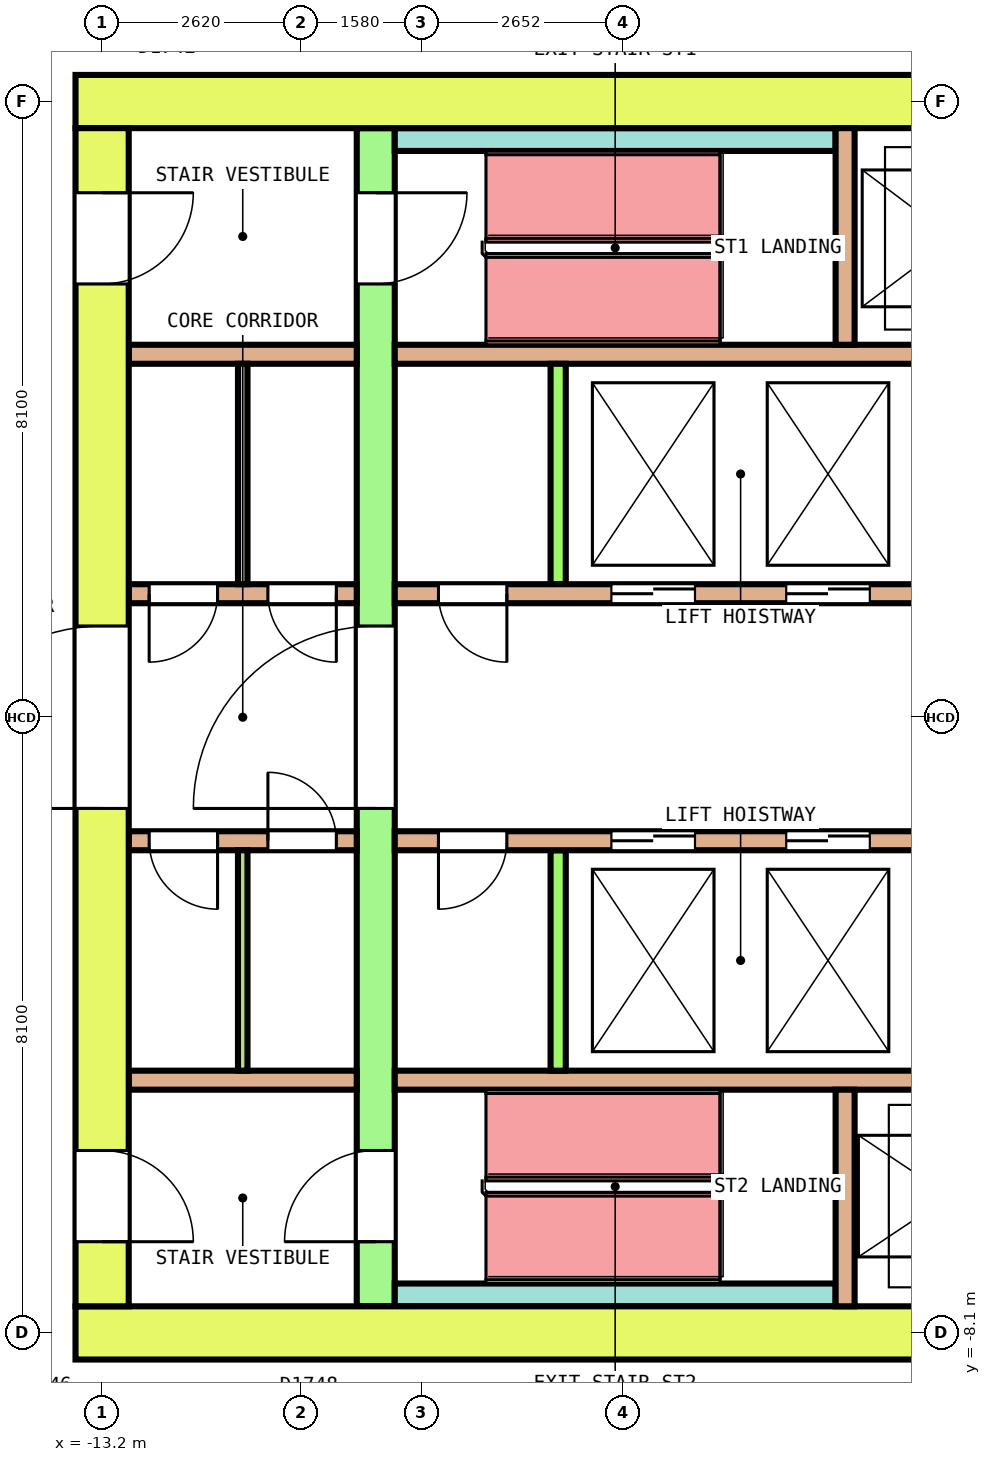
"""IFC4 building model, lengths in metres.
Left out: names, types, materials, properties, quantities, classifications, styles, units other than length and angle.
Written with IfcOpenShell. Run it as: python <this file> out.ifc"""

import sys

from ifc_helpers import new_model, si_unit, direction, frame, frame_2d, origin, place, context, subcontext, project, spatial, rectangle, extrude, element, fill, save


model = new_model("IFC4")
c1 = context("Model", 3, precision=1e-05, world=origin(), true_north=direction((0.0, 1.0)))
c2 = subcontext(c1, "Body", "Model", "MODEL_VIEW")
j1 = project(units=[si_unit("LENGTHUNIT", "METRE"), si_unit("PLANEANGLEUNIT", "RADIAN")], contexts=[c1])
p1 = place(None, origin())
s1 = spatial("IfcSite", under=j1, at=p1, CompositionType="ELEMENT")
p2 = place(p1, origin())
s2 = spatial("IfcBuilding", under=s1, at=p2, CompositionType="ELEMENT")
p3 = place(p2, frame((0.0, 0.0, 158.4)))
s3 = spatial("IfcBuildingStorey", under=s2, at=p3, CompositionType="ELEMENT", Elevation=158.4)
p4 = place(p3, frame((-13.55, 8.1, 0.0), z_axis=(0.0, 0.0, 1.0), x_axis=(1.0, 0.0, 0.0)))
e1 = element("IfcWall", 1, at=p4, inside=s3, PredefinedType="SHEAR", context=c2, shape_type="SweptSolid", body=[
    extrude(rectangle(XDim=27.1, YDim=0.7, at=frame_2d((13.55, 0.0))), origin(), (0.0, 0.0, 1.0), 4.1),
])
p5 = place(p4, frame((14.475, 0.0, 0.0)))
e2 = element("IfcOpeningElement", 2, at=p5, cuts=e1, PredefinedType="OPENING", context=c2, shape_type="SweptSolid", body=[
    extrude(rectangle(XDim=1.4, YDim=2.1, at=frame_2d((0.7, 1.05))), frame((0.0, 0.36, 0.0), z_axis=(0.0, -1.0, 0.0), x_axis=(1.0, 0.0, 0.0)), (0.0, 0.0, 1.0), 0.72),
])
p6 = place(p3, frame((-13.55, -8.1, 0.0), z_axis=(0.0, 0.0, 1.0), x_axis=(1.0, 0.0, 0.0)))
e3 = element("IfcWall", 3, at=p6, inside=s3, PredefinedType="SHEAR", context=c2, shape_type="SweptSolid", body=[
    extrude(rectangle(XDim=27.1, YDim=0.7, at=frame_2d((13.55, 0.0))), origin(), (0.0, 0.0, 1.0), 4.1),
])
p7 = place(p6, frame((15.1, 0.0, 0.0)))
e4 = element("IfcOpeningElement", 4, at=p7, cuts=e3, PredefinedType="OPENING", context=c2, shape_type="SweptSolid", body=[
    extrude(rectangle(XDim=1.2, YDim=2.1, at=frame_2d((0.6, 1.05))), frame((0.0, 0.36, 0.0), z_axis=(0.0, -1.0, 0.0), x_axis=(1.0, 0.0, 0.0)), (0.0, 0.0, 1.0), 0.72),
])
p8 = place(p3, frame((-13.2, -7.75, 0.0), z_axis=(0.0, 0.0, 1.0), x_axis=(0.0, 1.0, 0.0)))
e5 = element("IfcWall", 5, at=p8, inside=s3, PredefinedType="SHEAR", context=c2, shape_type="SweptSolid", body=[
    extrude(rectangle(XDim=15.5, YDim=0.7, at=frame_2d((7.75, 0.0))), origin(), (0.0, 0.0, 1.0), 4.1),
])
p9 = place(p8, frame((6.55, 0.0, 0.0)))
e6 = element("IfcOpeningElement", 6, at=p9, cuts=e5, PredefinedType="OPENING", context=c2, shape_type="SweptSolid", body=[
    extrude(rectangle(XDim=2.4, YDim=2.1, at=frame_2d((1.2, 1.05))), frame((0.0, 0.36, 0.0), z_axis=(0.0, -1.0, 0.0), x_axis=(1.0, 0.0, 0.0)), (0.0, 0.0, 1.0), 0.72),
])
p10 = place(p8, frame((13.45, 0.0, 0.0)))
e7 = element("IfcOpeningElement", 7, at=p10, cuts=e5, PredefinedType="OPENING", context=c2, shape_type="SweptSolid", body=[
    extrude(rectangle(XDim=1.2, YDim=2.1, at=frame_2d((0.6, 1.05))), frame((0.0, 0.36, 0.0), z_axis=(0.0, -1.0, 0.0), x_axis=(1.0, 0.0, 0.0)), (0.0, 0.0, 1.0), 0.72),
])
p11 = place(p8, frame((0.85, 0.0, 0.0)))
e8 = element("IfcOpeningElement", 8, at=p11, cuts=e5, PredefinedType="OPENING", context=c2, shape_type="SweptSolid", body=[
    extrude(rectangle(XDim=1.2, YDim=2.1, at=frame_2d((0.6, 1.05))), frame((0.0, 0.36, 0.0), z_axis=(0.0, -1.0, 0.0), x_axis=(1.0, 0.0, 0.0)), (0.0, 0.0, 1.0), 0.72),
])
p12 = place(p3, frame((-9.6, -7.75, 0.0), z_axis=(0.0, 0.0, 1.0), x_axis=(0.0, 1.0, 0.0)))
e9 = element("IfcWall", 9, at=p12, inside=s3, PredefinedType="SHEAR", context=c2, shape_type="SweptSolid", body=[
    extrude(rectangle(XDim=15.5, YDim=0.5, at=frame_2d((7.75, 0.0))), origin(), (0.0, 0.0, 1.0), 4.1),
])
p13 = place(p12, frame((6.55, 0.0, 0.0)))
e10 = element("IfcOpeningElement", 10, at=p13, cuts=e9, PredefinedType="OPENING", context=c2, shape_type="SweptSolid", body=[
    extrude(rectangle(XDim=2.4, YDim=2.1, at=frame_2d((1.2, 1.05))), frame((0.0, 0.26, 0.0), z_axis=(0.0, -1.0, 0.0), x_axis=(1.0, 0.0, 0.0)), (0.0, 0.0, 1.0), 0.52),
])
p14 = place(p12, frame((13.45, 0.0, 0.0)))
e11 = element("IfcOpeningElement", 11, at=p14, cuts=e9, PredefinedType="OPENING", context=c2, shape_type="SweptSolid", body=[
    extrude(rectangle(XDim=1.2, YDim=2.1, at=frame_2d((0.6, 1.05))), frame((0.0, 0.26, 0.0), z_axis=(0.0, -1.0, 0.0), x_axis=(1.0, 0.0, 0.0)), (0.0, 0.0, 1.0), 0.52),
])
p15 = place(p12, frame((0.85, 0.0, 0.0)))
e12 = element("IfcOpeningElement", 12, at=p15, cuts=e9, PredefinedType="OPENING", context=c2, shape_type="SweptSolid", body=[
    extrude(rectangle(XDim=1.2, YDim=2.1, at=frame_2d((0.6, 1.05))), frame((0.0, 0.26, 0.0), z_axis=(0.0, -1.0, 0.0), x_axis=(1.0, 0.0, 0.0)), (0.0, 0.0, 1.0), 0.52),
])
p16 = place(p3, frame((-12.85, 1.625, 0.0), z_axis=(0.0, 0.0, 1.0), x_axis=(1.0, 0.0, 0.0)))
e13 = element("IfcWall", 13, at=p16, inside=s3, PredefinedType="SOLIDWALL", context=c2, shape_type="SweptSolid", body=[
    extrude(rectangle(XDim=3.0, YDim=0.25, at=frame_2d((1.5, 0.0))), origin(), (0.0, 0.0, 1.0), 4.1),
])
p17 = place(p16, frame((0.269, 0.0, 0.0)))
e14 = element("IfcOpeningElement", 14, at=p17, cuts=e13, PredefinedType="OPENING", context=c2, shape_type="SweptSolid", body=[
    extrude(rectangle(XDim=0.9, YDim=2.1, at=frame_2d((0.45, 1.05))), frame((0.0, 0.135, 0.0), z_axis=(0.0, -1.0, 0.0), x_axis=(1.0, 0.0, 0.0)), (0.0, 0.0, 1.0), 0.27),
])
p18 = place(p16, frame((1.831, 0.0, 0.0)))
e15 = element("IfcOpeningElement", 15, at=p18, cuts=e13, PredefinedType="OPENING", context=c2, shape_type="SweptSolid", body=[
    extrude(rectangle(XDim=0.9, YDim=2.1, at=frame_2d((0.45, 1.05))), frame((0.0, 0.135, 0.0), z_axis=(0.0, -1.0, 0.0), x_axis=(1.0, 0.0, 0.0)), (0.0, 0.0, 1.0), 0.27),
])
p19 = place(p3, frame((-9.35, 1.625, 0.0), z_axis=(0.0, 0.0, 1.0), x_axis=(1.0, 0.0, 0.0)))
e16 = element("IfcWall", 16, at=p19, inside=s3, PredefinedType="SOLIDWALL", context=c2, shape_type="SweptSolid", body=[
    extrude(rectangle(XDim=18.7, YDim=0.25, at=frame_2d((9.35, 0.0))), origin(), (0.0, 0.0, 1.0), 4.1),
])
p20 = place(p19, frame((2.85, 0.0, 0.0)))
e17 = element("IfcOpeningElement", 17, at=p20, cuts=e16, PredefinedType="OPENING", context=c2, shape_type="SweptSolid", body=[
    extrude(rectangle(XDim=1.1, YDim=2.1, at=frame_2d((0.55, 1.05))), frame((0.0, 0.135, 0.0), z_axis=(0.0, -1.0, 0.0), x_axis=(1.0, 0.0, 0.0)), (0.0, 0.0, 1.0), 0.27),
])
p21 = place(p19, frame((5.15, 0.0, 0.0)))
e18 = element("IfcOpeningElement", 18, at=p21, cuts=e16, PredefinedType="OPENING", context=c2, shape_type="SweptSolid", body=[
    extrude(rectangle(XDim=1.1, YDim=2.1, at=frame_2d((0.55, 1.05))), frame((0.0, 0.135, 0.0), z_axis=(0.0, -1.0, 0.0), x_axis=(1.0, 0.0, 0.0)), (0.0, 0.0, 1.0), 0.27),
])
p22 = place(p19, frame((14.8, 0.0, 0.0)))
e19 = element("IfcOpeningElement", 19, at=p22, cuts=e16, PredefinedType="OPENING", context=c2, shape_type="SweptSolid", body=[
    extrude(rectangle(XDim=1.1, YDim=2.1, at=frame_2d((0.55, 1.05))), frame((0.0, 0.135, 0.0), z_axis=(0.0, -1.0, 0.0), x_axis=(1.0, 0.0, 0.0)), (0.0, 0.0, 1.0), 0.27),
])
p23 = place(p19, frame((0.575, 0.0, 0.0)))
e20 = element("IfcOpeningElement", 20, at=p23, cuts=e16, PredefinedType="OPENING", context=c2, shape_type="SweptSolid", body=[
    extrude(rectangle(XDim=0.9, YDim=2.1, at=frame_2d((0.45, 1.05))), frame((0.0, 0.135, 0.0), z_axis=(0.0, -1.0, 0.0), x_axis=(1.0, 0.0, 0.0)), (0.0, 0.0, 1.0), 0.27),
])
p24 = place(p19, frame((17.225, 0.0, 0.0)))
e21 = element("IfcOpeningElement", 21, at=p24, cuts=e16, PredefinedType="OPENING", context=c2, shape_type="SweptSolid", body=[
    extrude(rectangle(XDim=0.9, YDim=2.1, at=frame_2d((0.45, 1.05))), frame((0.0, 0.135, 0.0), z_axis=(0.0, -1.0, 0.0), x_axis=(1.0, 0.0, 0.0)), (0.0, 0.0, 1.0), 0.27),
])
p25 = place(p3, frame((-12.85, 4.775, 0.0), z_axis=(0.0, 0.0, 1.0), x_axis=(1.0, 0.0, 0.0)))
e22 = element("IfcWall", 22, at=p25, inside=s3, PredefinedType="SOLIDWALL", context=c2, shape_type="SweptSolid", body=[
    extrude(rectangle(XDim=3.0, YDim=0.25, at=frame_2d((1.5, 0.0))), origin(), (0.0, 0.0, 1.0), 4.1),
])
p26 = place(p3, frame((-9.35, 4.775, 0.0), z_axis=(0.0, 0.0, 1.0), x_axis=(1.0, 0.0, 0.0)))
e23 = element("IfcWall", 23, at=p26, inside=s3, PredefinedType="SOLIDWALL", context=c2, shape_type="SweptSolid", body=[
    extrude(rectangle(XDim=18.7, YDim=0.25, at=frame_2d((9.35, 0.0))), origin(), (0.0, 0.0, 1.0), 4.1),
])
p27 = place(p3, frame((-7.2, 1.75, 0.0), z_axis=(0.0, 0.0, 1.0), x_axis=(0.0, 1.0, 0.0)))
e24 = element("IfcWall", 24, at=p27, inside=s3, PredefinedType="SOLIDWALL", context=c2, shape_type="SweptSolid", body=[
    extrude(rectangle(XDim=2.9, YDim=0.2, at=frame_2d((1.45, 0.0))), origin(), (0.0, 0.0, 1.0), 4.1),
])
p28 = place(p3, frame((-12.85, -1.625, 0.0), z_axis=(0.0, 0.0, 1.0), x_axis=(1.0, 0.0, 0.0)))
e25 = element("IfcWall", 25, at=p28, inside=s3, PredefinedType="SOLIDWALL", context=c2, shape_type="SweptSolid", body=[
    extrude(rectangle(XDim=3.0, YDim=0.25, at=frame_2d((1.5, 0.0))), origin(), (0.0, 0.0, 1.0), 4.1),
])
p29 = place(p28, frame((0.269, 0.0, 0.0)))
e26 = element("IfcOpeningElement", 26, at=p29, cuts=e25, PredefinedType="OPENING", context=c2, shape_type="SweptSolid", body=[
    extrude(rectangle(XDim=0.9, YDim=2.1, at=frame_2d((0.45, 1.05))), frame((0.0, 0.135, 0.0), z_axis=(0.0, -1.0, 0.0), x_axis=(1.0, 0.0, 0.0)), (0.0, 0.0, 1.0), 0.27),
])
p30 = place(p28, frame((1.831, 0.0, 0.0)))
e27 = element("IfcOpeningElement", 27, at=p30, cuts=e25, PredefinedType="OPENING", context=c2, shape_type="SweptSolid", body=[
    extrude(rectangle(XDim=0.9, YDim=2.1, at=frame_2d((0.45, 1.05))), frame((0.0, 0.135, 0.0), z_axis=(0.0, -1.0, 0.0), x_axis=(1.0, 0.0, 0.0)), (0.0, 0.0, 1.0), 0.27),
])
p31 = place(p3, frame((-9.35, -1.625, 0.0), z_axis=(0.0, 0.0, 1.0), x_axis=(1.0, 0.0, 0.0)))
e28 = element("IfcWall", 28, at=p31, inside=s3, PredefinedType="SOLIDWALL", context=c2, shape_type="SweptSolid", body=[
    extrude(rectangle(XDim=18.7, YDim=0.25, at=frame_2d((9.35, 0.0))), origin(), (0.0, 0.0, 1.0), 4.1),
])
p32 = place(p31, frame((2.85, 0.0, 0.0)))
e29 = element("IfcOpeningElement", 29, at=p32, cuts=e28, PredefinedType="OPENING", context=c2, shape_type="SweptSolid", body=[
    extrude(rectangle(XDim=1.1, YDim=2.1, at=frame_2d((0.55, 1.05))), frame((0.0, 0.135, 0.0), z_axis=(0.0, -1.0, 0.0), x_axis=(1.0, 0.0, 0.0)), (0.0, 0.0, 1.0), 0.27),
])
p33 = place(p31, frame((5.15, 0.0, 0.0)))
e30 = element("IfcOpeningElement", 30, at=p33, cuts=e28, PredefinedType="OPENING", context=c2, shape_type="SweptSolid", body=[
    extrude(rectangle(XDim=1.1, YDim=2.1, at=frame_2d((0.55, 1.05))), frame((0.0, 0.135, 0.0), z_axis=(0.0, -1.0, 0.0), x_axis=(1.0, 0.0, 0.0)), (0.0, 0.0, 1.0), 0.27),
])
p34 = place(p31, frame((14.8, 0.0, 0.0)))
e31 = element("IfcOpeningElement", 31, at=p34, cuts=e28, PredefinedType="OPENING", context=c2, shape_type="SweptSolid", body=[
    extrude(rectangle(XDim=1.1, YDim=2.1, at=frame_2d((0.55, 1.05))), frame((0.0, 0.135, 0.0), z_axis=(0.0, -1.0, 0.0), x_axis=(1.0, 0.0, 0.0)), (0.0, 0.0, 1.0), 0.27),
])
p35 = place(p31, frame((0.575, 0.0, 0.0)))
e32 = element("IfcOpeningElement", 32, at=p35, cuts=e28, PredefinedType="OPENING", context=c2, shape_type="SweptSolid", body=[
    extrude(rectangle(XDim=0.9, YDim=2.1, at=frame_2d((0.45, 1.05))), frame((0.0, 0.135, 0.0), z_axis=(0.0, -1.0, 0.0), x_axis=(1.0, 0.0, 0.0)), (0.0, 0.0, 1.0), 0.27),
])
p36 = place(p31, frame((17.225, 0.0, 0.0)))
e33 = element("IfcOpeningElement", 33, at=p36, cuts=e28, PredefinedType="OPENING", context=c2, shape_type="SweptSolid", body=[
    extrude(rectangle(XDim=0.9, YDim=2.1, at=frame_2d((0.45, 1.05))), frame((0.0, 0.135, 0.0), z_axis=(0.0, -1.0, 0.0), x_axis=(1.0, 0.0, 0.0)), (0.0, 0.0, 1.0), 0.27),
])
p37 = place(p3, frame((-12.85, -4.775, 0.0), z_axis=(0.0, 0.0, 1.0), x_axis=(1.0, 0.0, 0.0)))
e34 = element("IfcWall", 34, at=p37, inside=s3, PredefinedType="SOLIDWALL", context=c2, shape_type="SweptSolid", body=[
    extrude(rectangle(XDim=3.0, YDim=0.25, at=frame_2d((1.5, 0.0))), origin(), (0.0, 0.0, 1.0), 4.1),
])
p38 = place(p3, frame((-9.35, -4.775, 0.0), z_axis=(0.0, 0.0, 1.0), x_axis=(1.0, 0.0, 0.0)))
e35 = element("IfcWall", 35, at=p38, inside=s3, PredefinedType="SOLIDWALL", context=c2, shape_type="SweptSolid", body=[
    extrude(rectangle(XDim=18.7, YDim=0.25, at=frame_2d((9.35, 0.0))), origin(), (0.0, 0.0, 1.0), 4.1),
])
p39 = place(p3, frame((-7.2, -4.65, 0.0), z_axis=(0.0, 0.0, 1.0), x_axis=(0.0, 1.0, 0.0)))
e36 = element("IfcWall", 36, at=p39, inside=s3, PredefinedType="SOLIDWALL", context=c2, shape_type="SweptSolid", body=[
    extrude(rectangle(XDim=2.9, YDim=0.2, at=frame_2d((1.45, 0.0))), origin(), (0.0, 0.0, 1.0), 4.1),
])
p40 = place(p3, frame((-9.35, 7.6, 0.0), z_axis=(0.0, 0.0, 1.0), x_axis=(1.0, 0.0, 0.0)))
e37 = element("IfcWall", 37, at=p40, inside=s3, PredefinedType="SOLIDWALL", context=c2, shape_type="SweptSolid", body=[
    extrude(rectangle(XDim=5.8, YDim=0.3, at=frame_2d((2.9, 0.0))), origin(), (0.0, 0.0, 1.0), 4.1),
])
p41 = place(p3, frame((-3.425, 4.9, 0.0), z_axis=(0.0, 0.0, 1.0), x_axis=(0.0, 1.0, 0.0)))
e38 = element("IfcWall", 38, at=p41, inside=s3, PredefinedType="SOLIDWALL", context=c2, shape_type="SweptSolid", body=[
    extrude(rectangle(XDim=2.85, YDim=0.25, at=frame_2d((1.425, 0.0))), origin(), (0.0, 0.0, 1.0), 4.1),
])
p42 = place(p3, frame((-9.35, -7.6, 0.0), z_axis=(0.0, 0.0, 1.0), x_axis=(1.0, 0.0, 0.0)))
e39 = element("IfcWall", 39, at=p42, inside=s3, PredefinedType="SOLIDWALL", context=c2, shape_type="SweptSolid", body=[
    extrude(rectangle(XDim=5.8, YDim=0.3, at=frame_2d((2.9, 0.0))), origin(), (0.0, 0.0, 1.0), 4.1),
])
p43 = place(p3, frame((-3.425, -7.75, 0.0), z_axis=(0.0, 0.0, 1.0), x_axis=(0.0, 1.0, 0.0)))
e40 = element("IfcWall", 40, at=p43, inside=s3, PredefinedType="SOLIDWALL", context=c2, shape_type="SweptSolid", body=[
    extrude(rectangle(XDim=2.85, YDim=0.25, at=frame_2d((1.425, 0.0))), origin(), (0.0, 0.0, 1.0), 4.1),
])
for number, where, z_axis, x_axis in (
    (41, (-11.35, 1.75, 0.0), (0.0, 0.0, 1.0), (0.0, 1.0, 0.0)),
    (42, (-11.35, -4.65, 0.0), (0.0, 0.0, 1.0), (0.0, 1.0, 0.0)),
):
    element("IfcWall", number, at=place(p3, frame(where, z_axis=z_axis, x_axis=x_axis)), inside=s3, PredefinedType="PARTITIONING", context=c2, shape_type="SweptSolid", body=[
        extrude(rectangle(XDim=2.9, YDim=0.125, at=frame_2d((1.45, 0.0))), origin(), (0.0, 0.0, 1.0), 4.1),
    ])
p44 = place(p20, origin())
e43 = element("IfcDoor", 43, at=p44, inside=s3, OperationType="DOUBLE_DOOR_SLIDING", PredefinedType="DOOR", context=c2, shape_type="SweptSolid", body=[
    extrude(rectangle(XDim=1.1, YDim=2.1, at=frame_2d((0.55, 1.05))), frame((0.0, 0.075, 0.0), z_axis=(0.0, -1.0, 0.0), x_axis=(1.0, 0.0, 0.0)), (0.0, 0.0, 1.0), 0.15),
])
fill(e17, e43)
p45 = place(p21, origin())
e44 = element("IfcDoor", 44, at=p45, inside=s3, OperationType="DOUBLE_DOOR_SLIDING", PredefinedType="DOOR", context=c2, shape_type="SweptSolid", body=[
    extrude(rectangle(XDim=1.1, YDim=2.1, at=frame_2d((0.55, 1.05))), frame((0.0, 0.075, 0.0), z_axis=(0.0, -1.0, 0.0), x_axis=(1.0, 0.0, 0.0)), (0.0, 0.0, 1.0), 0.15),
])
fill(e18, e44)
p46 = place(p32, origin())
e45 = element("IfcDoor", 45, at=p46, inside=s3, OperationType="DOUBLE_DOOR_SLIDING", PredefinedType="DOOR", context=c2, shape_type="SweptSolid", body=[
    extrude(rectangle(XDim=1.1, YDim=2.1, at=frame_2d((0.55, 1.05))), frame((0.0, 0.075, 0.0), z_axis=(0.0, -1.0, 0.0), x_axis=(1.0, 0.0, 0.0)), (0.0, 0.0, 1.0), 0.15),
])
fill(e29, e45)
p47 = place(p33, origin())
e46 = element("IfcDoor", 46, at=p47, inside=s3, OperationType="DOUBLE_DOOR_SLIDING", PredefinedType="DOOR", context=c2, shape_type="SweptSolid", body=[
    extrude(rectangle(XDim=1.1, YDim=2.1, at=frame_2d((0.55, 1.05))), frame((0.0, 0.075, 0.0), z_axis=(0.0, -1.0, 0.0), x_axis=(1.0, 0.0, 0.0)), (0.0, 0.0, 1.0), 0.15),
])
fill(e30, e46)
p48 = place(p13, origin())
e47 = element("IfcDoor", 47, at=p48, inside=s3, OperationType="DOUBLE_DOOR_SINGLE_SWING", PredefinedType="DOOR", context=c2, shape_type="SweptSolid", body=[
    extrude(rectangle(XDim=2.4, YDim=2.1, at=frame_2d((1.2, 1.05))), frame((0.0, 0.2, 0.0), z_axis=(0.0, -1.0, 0.0), x_axis=(1.0, 0.0, 0.0)), (0.0, 0.0, 1.0), 0.4),
])
fill(e10, e47)
p49 = place(p9, origin())
e48 = element("IfcDoor", 48, at=p49, inside=s3, OperationType="DOUBLE_DOOR_SINGLE_SWING", PredefinedType="DOOR", context=c2, shape_type="SweptSolid", body=[
    extrude(rectangle(XDim=2.4, YDim=2.1, at=frame_2d((1.2, 1.05))), frame((0.0, 0.3, 0.0), z_axis=(0.0, -1.0, 0.0), x_axis=(1.0, 0.0, 0.0)), (0.0, 0.0, 1.0), 0.6),
])
fill(e6, e48)
p50 = place(p14, origin())
e49 = element("IfcDoor", 49, at=p50, inside=s3, OperationType="SINGLE_SWING_LEFT", PredefinedType="DOOR", context=c2, shape_type="SweptSolid", body=[
    extrude(rectangle(XDim=1.2, YDim=2.1, at=frame_2d((0.6, 1.05))), frame((0.0, 0.2, 0.0), z_axis=(0.0, -1.0, 0.0), x_axis=(1.0, 0.0, 0.0)), (0.0, 0.0, 1.0), 0.4),
])
fill(e11, e49)
p51 = place(p10, origin())
e50 = element("IfcDoor", 50, at=p51, inside=s3, OperationType="SINGLE_SWING_RIGHT", PredefinedType="DOOR", context=c2, shape_type="SweptSolid", body=[
    extrude(rectangle(XDim=1.2, YDim=2.1, at=frame_2d((0.6, 1.05))), frame((0.0, 0.3, 0.0), z_axis=(0.0, -1.0, 0.0), x_axis=(1.0, 0.0, 0.0)), (0.0, 0.0, 1.0), 0.6),
])
fill(e7, e50)
p52 = place(p15, origin())
e51 = element("IfcDoor", 51, at=p52, inside=s3, OperationType="SINGLE_SWING_LEFT", PredefinedType="DOOR", context=c2, shape_type="SweptSolid", body=[
    extrude(rectangle(XDim=1.2, YDim=2.1, at=frame_2d((0.6, 1.05))), frame((0.0, 0.2, 0.0), z_axis=(0.0, -1.0, 0.0), x_axis=(1.0, 0.0, 0.0)), (0.0, 0.0, 1.0), 0.4),
])
fill(e12, e51)
p53 = place(p11, origin())
e52 = element("IfcDoor", 52, at=p53, inside=s3, OperationType="SINGLE_SWING_RIGHT", PredefinedType="DOOR", context=c2, shape_type="SweptSolid", body=[
    extrude(rectangle(XDim=1.2, YDim=2.1, at=frame_2d((0.6, 1.05))), frame((0.0, 0.3, 0.0), z_axis=(0.0, -1.0, 0.0), x_axis=(1.0, 0.0, 0.0)), (0.0, 0.0, 1.0), 0.6),
])
fill(e8, e52)
p54 = place(p17, origin())
e53 = element("IfcDoor", 53, at=p54, inside=s3, OperationType="SINGLE_SWING_LEFT", PredefinedType="DOOR", context=c2, shape_type="SweptSolid", body=[
    extrude(rectangle(XDim=0.9, YDim=2.1, at=frame_2d((0.45, 1.05))), frame((0.0, 0.075, 0.0), z_axis=(0.0, -1.0, 0.0), x_axis=(1.0, 0.0, 0.0)), (0.0, 0.0, 1.0), 0.15),
])
fill(e14, e53)
p55 = place(p18, origin())
e54 = element("IfcDoor", 54, at=p55, inside=s3, OperationType="SINGLE_SWING_RIGHT", PredefinedType="DOOR", context=c2, shape_type="SweptSolid", body=[
    extrude(rectangle(XDim=0.9, YDim=2.1, at=frame_2d((0.45, 1.05))), frame((0.0, 0.075, 0.0), z_axis=(0.0, -1.0, 0.0), x_axis=(1.0, 0.0, 0.0)), (0.0, 0.0, 1.0), 0.15),
])
fill(e15, e54)
p56 = place(p23, origin())
e55 = element("IfcDoor", 55, at=p56, inside=s3, OperationType="SINGLE_SWING_LEFT", PredefinedType="DOOR", context=c2, shape_type="SweptSolid", body=[
    extrude(rectangle(XDim=0.9, YDim=2.1, at=frame_2d((0.45, 1.05))), frame((0.0, 0.075, 0.0), z_axis=(0.0, -1.0, 0.0), x_axis=(1.0, 0.0, 0.0)), (0.0, 0.0, 1.0), 0.15),
])
fill(e20, e55)
p57 = place(p29, origin())
e56 = element("IfcDoor", 56, at=p57, inside=s3, OperationType="SINGLE_SWING_LEFT", PredefinedType="DOOR", context=c2, shape_type="SweptSolid", body=[
    extrude(rectangle(XDim=0.9, YDim=2.1, at=frame_2d((0.45, 1.05))), frame((0.0, 0.075, 0.0), z_axis=(0.0, -1.0, 0.0), x_axis=(1.0, 0.0, 0.0)), (0.0, 0.0, 1.0), 0.15),
])
fill(e26, e56)
p58 = place(p30, origin())
e57 = element("IfcDoor", 57, at=p58, inside=s3, OperationType="SINGLE_SWING_RIGHT", PredefinedType="DOOR", context=c2, shape_type="SweptSolid", body=[
    extrude(rectangle(XDim=0.9, YDim=2.1, at=frame_2d((0.45, 1.05))), frame((0.0, 0.075, 0.0), z_axis=(0.0, -1.0, 0.0), x_axis=(1.0, 0.0, 0.0)), (0.0, 0.0, 1.0), 0.15),
])
fill(e27, e57)
p59 = place(p35, origin())
e58 = element("IfcDoor", 58, at=p59, inside=s3, OperationType="SINGLE_SWING_LEFT", PredefinedType="DOOR", context=c2, shape_type="SweptSolid", body=[
    extrude(rectangle(XDim=0.9, YDim=2.1, at=frame_2d((0.45, 1.05))), frame((0.0, 0.075, 0.0), z_axis=(0.0, -1.0, 0.0), x_axis=(1.0, 0.0, 0.0)), (0.0, 0.0, 1.0), 0.15),
])
fill(e32, e58)
save(model, sys.argv[1])
